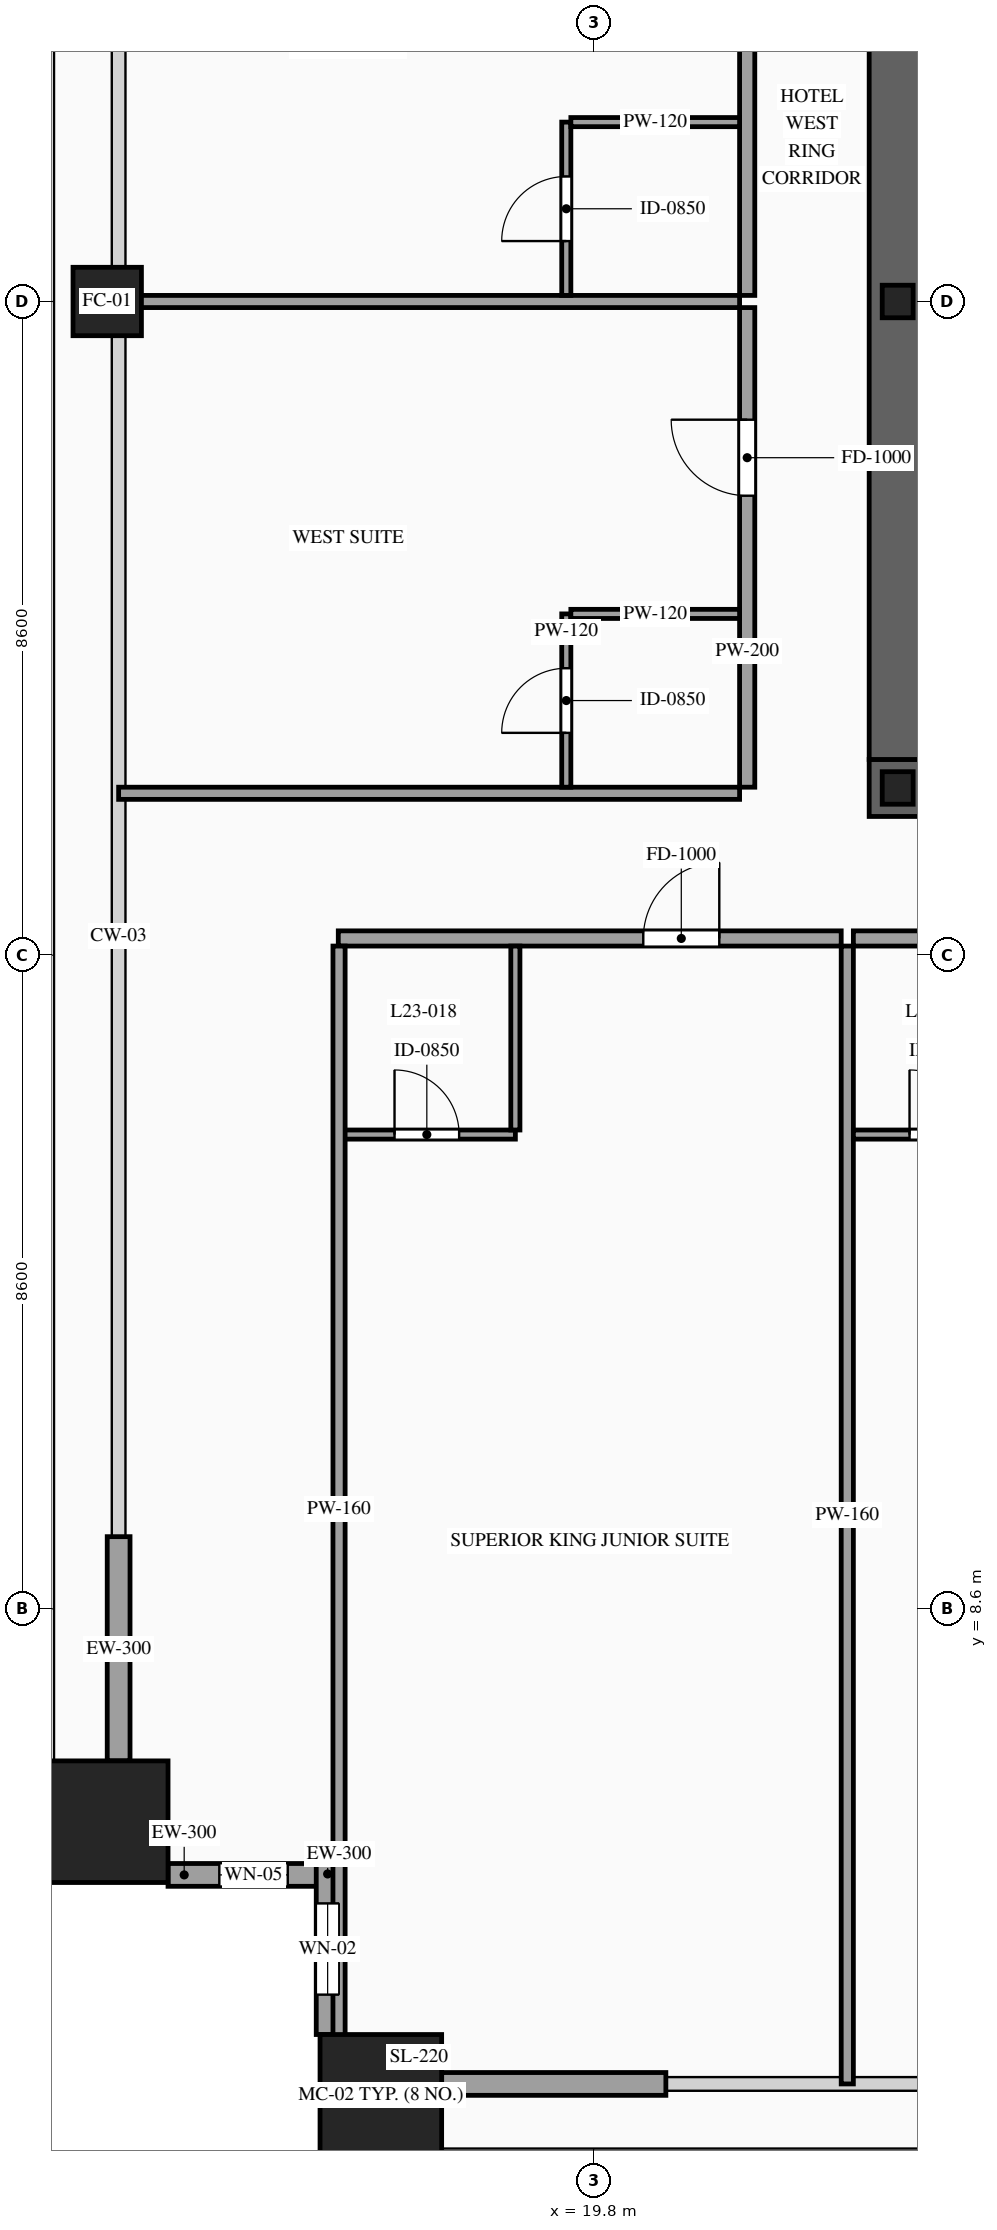
"""IFC4 building model, lengths in metres.
Left out: names, types, materials, properties, quantities, classifications, styles, units other than length and angle.
Written with IfcOpenShell. Run it as: python <this file> out.ifc"""

import sys

from ifc_helpers import new_model, si_unit, direction, frame, frame_2d, origin, origin_2d, place, context, subcontext, project, spatial, rectangle, hollow_rectangle, i_section, extrude, source, transform, mapped, element, fill, save


model = new_model("IFC4")
c1 = context("Model", 3, precision=1e-05, world=origin(), true_north=direction((0.0, 1.0)))
c2 = subcontext(c1, "Body", "Model", "MODEL_VIEW")
j1 = project(units=[si_unit("LENGTHUNIT", "METRE"), si_unit("PLANEANGLEUNIT", "RADIAN")], contexts=[c1])
p1 = place(None, origin())
s1 = spatial("IfcSite", under=j1, at=p1, CompositionType="ELEMENT")
p2 = place(p1, origin())
s2 = spatial("IfcBuilding", under=s1, at=p2, CompositionType="ELEMENT")
p3 = place(p2, frame((0.0, 0.0, 90.2)))
s3 = spatial("IfcBuildingStorey", under=s2, at=p3, CompositionType="ELEMENT", Elevation=90.2)
p4 = place(p3, frame((23.425, 19.4, 0.0), z_axis=(0.0, 0.0, 1.0), x_axis=(1.0, 0.0, 0.0)))
e1 = element("IfcWall", 1, at=p4, inside=s3, PredefinedType="SHEAR", context=c2, shape_type="SweptSolid", body=[
    extrude(rectangle(XDim=27.15, YDim=0.75, at=frame_2d((13.575, 0.0))), origin(), (0.0, 0.0, 1.0), 3.6),
])
p5 = place(p4, frame((2.025, 0.0, 0.0)))
e2 = element("IfcOpeningElement", 2, at=p5, cuts=e1, PredefinedType="OPENING", context=c2, shape_type="SweptSolid", body=[
    extrude(rectangle(XDim=1.1, YDim=2.2, at=frame_2d((0.55, 1.1))), frame((0.0, 0.39, 0.0), z_axis=(0.0, -1.0, 0.0), x_axis=(1.0, 0.0, 0.0)), (0.0, 0.0, 1.0), 0.78),
])
p6 = place(p4, frame((9.925, 0.0, 0.0)))
e3 = element("IfcOpeningElement", 3, at=p6, cuts=e1, PredefinedType="OPENING", context=c2, shape_type="SweptSolid", body=[
    extrude(rectangle(XDim=1.1, YDim=2.2, at=frame_2d((0.55, 1.1))), frame((0.0, 0.39, 0.0), z_axis=(0.0, -1.0, 0.0), x_axis=(1.0, 0.0, 0.0)), (0.0, 0.0, 1.0), 0.78),
])
p7 = place(p4, frame((23.125, 0.0, 0.0)))
e4 = element("IfcOpeningElement", 4, at=p7, cuts=e1, PredefinedType="OPENING", context=c2, shape_type="SweptSolid", body=[
    extrude(rectangle(XDim=1.1, YDim=2.2, at=frame_2d((0.55, 1.1))), frame((0.0, 0.39, 0.0), z_axis=(0.0, -1.0, 0.0), x_axis=(1.0, 0.0, 0.0)), (0.0, 0.0, 1.0), 0.78),
])
p8 = place(p4, frame((19.745, 0.0, 0.0)))
e5 = element("IfcOpeningElement", 5, at=p8, cuts=e1, PredefinedType="OPENING", context=c2, shape_type="SweptSolid", body=[
    extrude(rectangle(XDim=0.9, YDim=2.15, at=frame_2d((0.45, 1.075))), frame((0.0, 0.39, 0.0), z_axis=(0.0, -1.0, 0.0), x_axis=(1.0, 0.0, 0.0)), (0.0, 0.0, 1.0), 0.78),
])
p9 = place(p4, frame((18.305, 0.0, 0.0)))
e6 = element("IfcOpeningElement", 6, at=p9, cuts=e1, PredefinedType="OPENING", context=c2, shape_type="SweptSolid", body=[
    extrude(rectangle(XDim=0.9, YDim=2.15, at=frame_2d((0.45, 1.075))), frame((0.0, 0.39, 0.0), z_axis=(0.0, -1.0, 0.0), x_axis=(1.0, 0.0, 0.0)), (0.0, 0.0, 1.0), 0.78),
])
m1 = source(origin(), c2, "Body", "SweptSolid", [
    extrude(rectangle(XDim=12.05, YDim=0.75, at=frame_2d((6.025, 0.0))), origin(), (0.0, 0.0, 1.0), 3.6),
])
p10 = place(p3, frame((23.8, 19.775, 0.0), z_axis=(0.0, 0.0, 1.0), x_axis=(0.0, 1.0, 0.0)))
e7 = element("IfcWall", 7, at=p10, inside=s3, PredefinedType="SHEAR", context=c2, shape_type="MappedRepresentation", body=[
    mapped(m1, transform((0.0, 0.0, 0.0), scale=1.0)),
])
m2 = source(origin(), c2, "Body", "SweptSolid", [
    extrude(i_section(OverallWidth=0.407, OverallDepth=0.428, WebThickness=0.02, FlangeThickness=0.035, at=origin_2d()), origin(), (0.0, 0.0, 1.0), 3.6),
])
for number, where, z_axis, x_axis in (
    (8, (23.8, 19.4, 0.0), (0.0, 0.0, 1.0), (1.0, 0.0, 0.0)),
    (9, (23.8, 25.8, 0.0), (0.0, 0.0, 1.0), (1.0, 0.0, 0.0)),
):
    element("IfcColumn", number, at=place(p3, frame(where, z_axis=z_axis, x_axis=x_axis)), inside=s3, PredefinedType="COLUMN", context=c2, shape_type="MappedRepresentation", body=[
        mapped(m2, transform((0.0, 0.0, 0.0), scale=1.0)),
    ])
m3 = source(origin(), c2, "Body", "SweptSolid", [
    extrude(hollow_rectangle(XDim=1.6, YDim=1.6, WallThickness=0.07, at=origin_2d()), origin(), (0.0, 0.0, 1.0), 3.6),
])
for number, where, z_axis, x_axis in (
    (10, (17.0, 2.2, 0.0), (0.0, 0.0, 1.0), (1.0, 0.0, 0.0)),
    (11, (13.4, 5.8, 0.0), (0.0, 0.0, 1.0), (1.0, 0.0, 0.0)),
):
    element("IfcColumn", number, at=place(p3, frame(where, z_axis=z_axis, x_axis=x_axis)), inside=s3, PredefinedType="COLUMN", context=c2, shape_type="MappedRepresentation", body=[
        mapped(m3, transform((0.0, 0.0, 0.0), scale=1.0)),
    ])
m4 = source(origin(), c2, "Body", "SweptSolid", [
    extrude(hollow_rectangle(XDim=0.9, YDim=0.9, WallThickness=0.042, at=origin_2d()), origin(), (0.0, 0.0, 1.0), 3.6),
])
p11 = place(p3, frame((13.4, 25.8, 0.0), z_axis=(0.0, 0.0, 1.0), x_axis=(1.0, 0.0, 0.0)))
e12 = element("IfcColumn", 12, at=p11, inside=s3, PredefinedType="COLUMN", context=c2, shape_type="MappedRepresentation", body=[
    mapped(m4, transform((0.0, 0.0, 0.0), scale=1.0)),
])
p12 = place(p3, frame((14.2, 5.1, 0.0), z_axis=(0.0, 0.0, 1.0), x_axis=(1.0, 0.0, 0.0)))
e13 = element("IfcWall", 13, at=p12, inside=s3, PredefinedType="SOLIDWALL", context=c2, shape_type="SweptSolid", body=[
    extrude(rectangle(XDim=2.25, YDim=0.3, at=frame_2d((1.125, 0.0))), origin(), (0.0, 0.0, 1.0), 3.38),
])
p13 = place(p12, frame((0.675, 0.0, 0.85)))
e14 = element("IfcOpeningElement", 14, at=p13, cuts=e13, PredefinedType="OPENING", context=c2, shape_type="SweptSolid", body=[
    extrude(rectangle(XDim=0.9, YDim=1.5, at=frame_2d((0.45, 0.75))), frame((0.0, 0.165, 0.0), z_axis=(0.0, -1.0, 0.0), x_axis=(1.0, 0.0, 0.0)), (0.0, 0.0, 1.0), 0.33),
])
p14 = place(p3, frame((16.3, 5.25, 0.0), z_axis=(0.0, 0.0, 1.0), x_axis=(0.0, -1.0, 0.0)))
e15 = element("IfcWall", 15, at=p14, inside=s3, PredefinedType="SOLIDWALL", context=c2, shape_type="SweptSolid", body=[
    extrude(rectangle(XDim=2.25, YDim=0.3, at=frame_2d((1.125, 0.0))), origin(), (0.0, 0.0, 1.0), 3.38),
])
p15 = place(p14, frame((0.525, 0.0, 0.85)))
e16 = element("IfcOpeningElement", 16, at=p15, cuts=e15, PredefinedType="OPENING", context=c2, shape_type="SweptSolid", body=[
    extrude(rectangle(XDim=1.2, YDim=2.1, at=frame_2d((0.6, 1.05))), frame((0.0, 0.165, 0.0), z_axis=(0.0, -1.0, 0.0), x_axis=(1.0, 0.0, 0.0)), (0.0, 0.0, 1.0), 0.33),
])
m5 = source(origin(), c2, "Body", "SweptSolid", [
    extrude(rectangle(XDim=2.95, YDim=0.3, at=frame_2d((1.475, 0.0))), origin(), (0.0, 0.0, 1.0), 2.775),
])
for number, where, z_axis, x_axis in (
    (17, (17.8, 2.35, 0.0), (0.0, 0.0, 1.0), (1.0, 0.0, 0.0)),
    (18, (13.55, 6.6, 0.0), (0.0, 0.0, 1.0), (0.0, 1.0, 0.0)),
):
    element("IfcWall", number, at=place(p3, frame(where, z_axis=z_axis, x_axis=x_axis)), inside=s3, PredefinedType="SOLIDWALL", context=c2, shape_type="MappedRepresentation", body=[
        mapped(m5, transform((0.0, 0.0, 0.0), scale=1.0)),
    ])
p16 = place(p3, frame((16.44, 17.42, 0.0), z_axis=(0.0, 0.0, 1.0), x_axis=(1.0, 0.0, 0.0)))
e19 = element("IfcWall", 19, at=p16, inside=s3, PredefinedType="PARTITIONING", context=c2, shape_type="SweptSolid", body=[
    extrude(rectangle(XDim=6.617, YDim=0.2, at=frame_2d((3.309, 0.0))), origin(), (0.0, 0.0, 1.0), 3.38),
])
p17 = place(p16, frame((4.013, 0.0, 0.0)))
e20 = element("IfcOpeningElement", 20, at=p17, cuts=e19, PredefinedType="OPENING", context=c2, shape_type="SweptSolid", body=[
    extrude(rectangle(XDim=1.0, YDim=2.2, at=frame_2d((0.5, 1.1))), frame((0.0, 0.115, 0.0), z_axis=(0.0, -1.0, 0.0), x_axis=(1.0, 0.0, 0.0)), (0.0, 0.0, 1.0), 0.23),
])
m6 = source(origin(), c2, "Body", "SweptSolid", [
    extrude(rectangle(XDim=14.97, YDim=0.16, at=frame_2d((7.485, 0.0))), origin(), (0.0, 0.0, 1.0), 3.38),
])
p18 = place(p3, frame((23.137, 2.35, 0.0), z_axis=(0.0, 0.0, 1.0), x_axis=(0.0, 1.0, 0.0)))
e21 = element("IfcWall", 21, at=p18, inside=s3, PredefinedType="PARTITIONING", context=c2, shape_type="MappedRepresentation", body=[
    mapped(m6, transform((0.0, 0.0, 0.0), scale=1.0)),
])
p19 = place(p3, frame((16.44, 14.84, 0.0), z_axis=(0.0, 0.0, 1.0), x_axis=(1.0, 0.0, 0.0)))
e22 = element("IfcWall", 22, at=p19, inside=s3, PredefinedType="PARTITIONING", context=c2, shape_type="SweptSolid", body=[
    extrude(rectangle(XDim=2.33, YDim=0.12, at=frame_2d((1.165, 0.0))), origin(), (0.0, 0.0, 1.0), 3.38),
])
p20 = place(p19, frame((0.74, 0.0, 0.0)))
e23 = element("IfcOpeningElement", 23, at=p20, cuts=e22, PredefinedType="OPENING", context=c2, shape_type="SweptSolid", body=[
    extrude(rectangle(XDim=0.85, YDim=2.1, at=frame_2d((0.425, 1.05))), frame((0.0, 0.075, 0.0), z_axis=(0.0, -1.0, 0.0), x_axis=(1.0, 0.0, 0.0)), (0.0, 0.0, 1.0), 0.15),
])
m7 = source(origin(), c2, "Body", "SweptSolid", [
    extrude(rectangle(XDim=2.42, YDim=0.12, at=frame_2d((1.21, 0.0))), origin(), (0.0, 0.0, 1.0), 3.38),
])
p21 = place(p3, frame((18.77, 14.9, 0.0), z_axis=(0.0, 0.0, 1.0), x_axis=(0.0, 1.0, 0.0)))
e24 = element("IfcWall", 24, at=p21, inside=s3, PredefinedType="PARTITIONING", context=c2, shape_type="MappedRepresentation", body=[
    mapped(m7, transform((0.0, 0.0, 0.0), scale=1.0)),
])
p22 = place(p3, frame((23.217, 17.42, 0.0), z_axis=(0.0, 0.0, 1.0), x_axis=(1.0, 0.0, 0.0)))
e25 = element("IfcWall", 25, at=p22, inside=s3, PredefinedType="PARTITIONING", context=c2, shape_type="SweptSolid", body=[
    extrude(rectangle(XDim=4.398, YDim=0.2, at=frame_2d((2.199, 0.0))), origin(), (0.0, 0.0, 1.0), 3.38),
])
p23 = place(p22, frame((2.903, 0.0, 0.0)))
e26 = element("IfcOpeningElement", 26, at=p23, cuts=e25, PredefinedType="OPENING", context=c2, shape_type="SweptSolid", body=[
    extrude(rectangle(XDim=1.0, YDim=2.2, at=frame_2d((0.5, 1.1))), frame((0.0, 0.115, 0.0), z_axis=(0.0, -1.0, 0.0), x_axis=(1.0, 0.0, 0.0)), (0.0, 0.0, 1.0), 0.23),
])
p24 = place(p3, frame((23.217, 14.84, 0.0), z_axis=(0.0, 0.0, 1.0), x_axis=(1.0, 0.0, 0.0)))
e27 = element("IfcWall", 27, at=p24, inside=s3, PredefinedType="PARTITIONING", context=c2, shape_type="SweptSolid", body=[
    extrude(rectangle(XDim=2.328, YDim=0.12, at=frame_2d((1.164, 0.0))), origin(), (0.0, 0.0, 1.0), 3.38),
])
p25 = place(p24, frame((0.739, 0.0, 0.0)))
e28 = element("IfcOpeningElement", 28, at=p25, cuts=e27, PredefinedType="OPENING", context=c2, shape_type="SweptSolid", body=[
    extrude(rectangle(XDim=0.85, YDim=2.1, at=frame_2d((0.425, 1.05))), frame((0.0, 0.075, 0.0), z_axis=(0.0, -1.0, 0.0), x_axis=(1.0, 0.0, 0.0)), (0.0, 0.0, 1.0), 0.15),
])
m8 = source(origin(), c2, "Body", "SweptSolid", [
    extrude(rectangle(XDim=14.82, YDim=0.16, at=frame_2d((7.41, 0.0))), origin(), (0.0, 0.0, 1.0), 3.38),
])
p26 = place(p3, frame((16.45, 2.5, 0.0), z_axis=(0.0, 0.0, 1.0), x_axis=(0.0, 1.0, 0.0)))
e29 = element("IfcWall", 29, at=p26, inside=s3, PredefinedType="PARTITIONING", context=c2, shape_type="MappedRepresentation", body=[
    mapped(m8, transform((0.0, 0.0, 0.0), scale=1.0)),
])
p27 = place(p3, frame((21.82, 19.41, 0.0), z_axis=(0.0, 0.0, 1.0), x_axis=(0.0, 1.0, 0.0)))
e30 = element("IfcWall", 30, at=p27, inside=s3, PredefinedType="PARTITIONING", context=c2, shape_type="SweptSolid", body=[
    extrude(rectangle(XDim=6.31, YDim=0.2, at=frame_2d((3.155, 0.0))), origin(), (0.0, 0.0, 1.0), 3.38),
])
p28 = place(p27, frame((3.835, 0.0, 0.0)))
e31 = element("IfcOpeningElement", 31, at=p28, cuts=e30, PredefinedType="OPENING", context=c2, shape_type="SweptSolid", body=[
    extrude(rectangle(XDim=1.0, YDim=2.2, at=frame_2d((0.5, 1.1))), frame((0.0, 0.115, 0.0), z_axis=(0.0, -1.0, 0.0), x_axis=(1.0, 0.0, 0.0)), (0.0, 0.0, 1.0), 0.23),
])
m9 = source(origin(), c2, "Body", "SweptSolid", [
    extrude(rectangle(XDim=8.17, YDim=0.16, at=frame_2d((4.085, 0.0))), origin(), (0.0, 0.0, 1.0), 2.675),
])
p29 = place(p3, frame((13.55, 25.8, 0.0), z_axis=(0.0, 0.0, 1.0), x_axis=(1.0, 0.0, 0.0)))
e32 = element("IfcWall", 32, at=p29, inside=s3, PredefinedType="PARTITIONING", context=c2, shape_type="MappedRepresentation", body=[
    mapped(m9, transform((0.0, 0.0, 0.0), scale=1.0)),
])
m10 = source(origin(), c2, "Body", "SweptSolid", [
    extrude(rectangle(XDim=8.17, YDim=0.16, at=frame_2d((4.085, 0.0))), origin(), (0.0, 0.0, 1.0), 2.875),
])
p30 = place(p3, frame((13.55, 19.33, 0.0), z_axis=(0.0, 0.0, 1.0), x_axis=(1.0, 0.0, 0.0)))
e33 = element("IfcWall", 33, at=p30, inside=s3, PredefinedType="PARTITIONING", context=c2, shape_type="MappedRepresentation", body=[
    mapped(m10, transform((0.0, 0.0, 0.0), scale=1.0)),
])
p31 = place(p3, frame((19.44, 19.41, 0.0), z_axis=(0.0, 0.0, 1.0), x_axis=(0.0, 1.0, 0.0)))
e34 = element("IfcWall", 34, at=p31, inside=s3, PredefinedType="PARTITIONING", context=c2, shape_type="SweptSolid", body=[
    extrude(rectangle(XDim=2.28, YDim=0.12, at=frame_2d((1.14, 0.0))), origin(), (0.0, 0.0, 1.0), 3.38),
])
p32 = place(p31, frame((0.715, 0.0, 0.0)))
e35 = element("IfcOpeningElement", 35, at=p32, cuts=e34, PredefinedType="OPENING", context=c2, shape_type="SweptSolid", body=[
    extrude(rectangle(XDim=0.85, YDim=2.1, at=frame_2d((0.425, 1.05))), frame((0.0, 0.075, 0.0), z_axis=(0.0, -1.0, 0.0), x_axis=(1.0, 0.0, 0.0)), (0.0, 0.0, 1.0), 0.15),
])
m11 = source(origin(), c2, "Body", "SweptSolid", [
    extrude(rectangle(XDim=2.22, YDim=0.12, at=frame_2d((1.11, 0.0))), origin(), (0.0, 0.0, 1.0), 3.38),
])
p33 = place(p3, frame((19.5, 21.69, 0.0), z_axis=(0.0, 0.0, 1.0), x_axis=(1.0, 0.0, 0.0)))
e36 = element("IfcWall", 36, at=p33, inside=s3, PredefinedType="PARTITIONING", context=c2, shape_type="MappedRepresentation", body=[
    mapped(m11, transform((0.0, 0.0, 0.0), scale=1.0)),
])
p34 = place(p3, frame((21.82, 25.88, 0.0), z_axis=(0.0, 0.0, 1.0), x_axis=(0.0, 1.0, 0.0)))
e37 = element("IfcWall", 37, at=p34, inside=s3, PredefinedType="PARTITIONING", context=c2, shape_type="SweptSolid", body=[
    extrude(rectangle(XDim=6.31, YDim=0.2, at=frame_2d((3.155, 0.0))), origin(), (0.0, 0.0, 1.0), 3.38),
])
p35 = place(p34, frame((3.835, 0.0, 0.0)))
e38 = element("IfcOpeningElement", 38, at=p35, cuts=e37, PredefinedType="OPENING", context=c2, shape_type="SweptSolid", body=[
    extrude(rectangle(XDim=1.0, YDim=2.2, at=frame_2d((0.5, 1.1))), frame((0.0, 0.115, 0.0), z_axis=(0.0, -1.0, 0.0), x_axis=(1.0, 0.0, 0.0)), (0.0, 0.0, 1.0), 0.23),
])
p36 = place(p3, frame((19.44, 25.88, 0.0), z_axis=(0.0, 0.0, 1.0), x_axis=(0.0, 1.0, 0.0)))
e39 = element("IfcWall", 39, at=p36, inside=s3, PredefinedType="PARTITIONING", context=c2, shape_type="SweptSolid", body=[
    extrude(rectangle(XDim=2.28, YDim=0.12, at=frame_2d((1.14, 0.0))), origin(), (0.0, 0.0, 1.0), 3.38),
])
p37 = place(p36, frame((0.715, 0.0, 0.0)))
e40 = element("IfcOpeningElement", 40, at=p37, cuts=e39, PredefinedType="OPENING", context=c2, shape_type="SweptSolid", body=[
    extrude(rectangle(XDim=0.85, YDim=2.1, at=frame_2d((0.425, 1.05))), frame((0.0, 0.075, 0.0), z_axis=(0.0, -1.0, 0.0), x_axis=(1.0, 0.0, 0.0)), (0.0, 0.0, 1.0), 0.15),
])
p38 = place(p3, frame((19.5, 28.16, 0.0), z_axis=(0.0, 0.0, 1.0), x_axis=(1.0, 0.0, 0.0)))
e41 = element("IfcWall", 41, at=p38, inside=s3, PredefinedType="PARTITIONING", context=c2, shape_type="MappedRepresentation", body=[
    mapped(m11, transform((0.0, 0.0, 0.0), scale=1.0)),
])
m12 = source(origin(), c2, "Body", "SweptSolid", [
    extrude(rectangle(XDim=0.9, YDim=1.5, at=frame_2d((0.45, 0.75))), frame((0.0, 0.03, 0.0), z_axis=(0.0, -1.0, 0.0), x_axis=(1.0, 0.0, 0.0)), (0.0, 0.0, 1.0), 0.06),
])
p39 = place(p13, origin())
e42 = element("IfcWindow", 42, at=p39, inside=s3, PartitioningType="SINGLE_PANEL", PredefinedType="WINDOW", context=c2, shape_type="MappedRepresentation", body=[
    mapped(m12, transform((0.0, 0.0, 0.0), scale=1.0)),
])
fill(e14, e42)
m13 = source(origin(), c2, "Body", "SweptSolid", [
    extrude(rectangle(XDim=1.2, YDim=2.1, at=frame_2d((0.6, 1.05))), frame((0.0, 0.03, 0.0), z_axis=(0.0, -1.0, 0.0), x_axis=(1.0, 0.0, 0.0)), (0.0, 0.0, 1.0), 0.06),
])
p40 = place(p15, origin())
e43 = element("IfcWindow", 43, at=p40, inside=s3, PartitioningType="SINGLE_PANEL", PredefinedType="WINDOW", context=c2, shape_type="MappedRepresentation", body=[
    mapped(m13, transform((0.0, 0.0, 0.0), scale=1.0)),
])
fill(e16, e43)
m14 = source(origin(), c2, "Body", "SweptSolid", [
    extrude(rectangle(XDim=1.0, YDim=2.2, at=frame_2d((0.5, 1.1))), frame((0.0, 0.025, 0.0), z_axis=(0.0, -1.0, 0.0), x_axis=(1.0, 0.0, 0.0)), (0.0, 0.0, 1.0), 0.05),
])
p41 = place(p17, origin())
e44 = element("IfcDoor", 44, at=p41, inside=s3, OperationType="SINGLE_SWING_RIGHT", PredefinedType="DOOR", context=c2, shape_type="MappedRepresentation", body=[
    mapped(m14, transform((0.0, 0.0, 0.0), scale=1.0)),
])
fill(e20, e44)
m15 = source(origin(), c2, "Body", "SweptSolid", [
    extrude(rectangle(XDim=0.85, YDim=2.1, at=frame_2d((0.425, 1.05))), frame((0.0, 0.025, 0.0), z_axis=(0.0, -1.0, 0.0), x_axis=(1.0, 0.0, 0.0)), (0.0, 0.0, 1.0), 0.05),
])
p42 = place(p20, origin())
e45 = element("IfcDoor", 45, at=p42, inside=s3, OperationType="SINGLE_SWING_LEFT", PredefinedType="DOOR", context=c2, shape_type="MappedRepresentation", body=[
    mapped(m15, transform((0.0, 0.0, 0.0), scale=1.0)),
])
fill(e23, e45)
p43 = place(p25, origin())
e46 = element("IfcDoor", 46, at=p43, inside=s3, OperationType="SINGLE_SWING_LEFT", PredefinedType="DOOR", context=c2, shape_type="MappedRepresentation", body=[
    mapped(m15, transform((0.0, 0.0, 0.0), scale=1.0)),
])
fill(e28, e46)
p44 = place(p28, origin())
e47 = element("IfcDoor", 47, at=p44, inside=s3, OperationType="SINGLE_SWING_RIGHT", PredefinedType="DOOR", context=c2, shape_type="MappedRepresentation", body=[
    mapped(m14, transform((0.0, 0.0, 0.0), scale=1.0)),
])
fill(e31, e47)
p45 = place(p32, origin())
e48 = element("IfcDoor", 48, at=p45, inside=s3, OperationType="SINGLE_SWING_LEFT", PredefinedType="DOOR", context=c2, shape_type="MappedRepresentation", body=[
    mapped(m15, transform((0.0, 0.0, 0.0), scale=1.0)),
])
fill(e35, e48)
p46 = place(p37, origin())
e49 = element("IfcDoor", 49, at=p46, inside=s3, OperationType="SINGLE_SWING_LEFT", PredefinedType="DOOR", context=c2, shape_type="MappedRepresentation", body=[
    mapped(m15, transform((0.0, 0.0, 0.0), scale=1.0)),
])
fill(e40, e49)
save(model, sys.argv[1])
